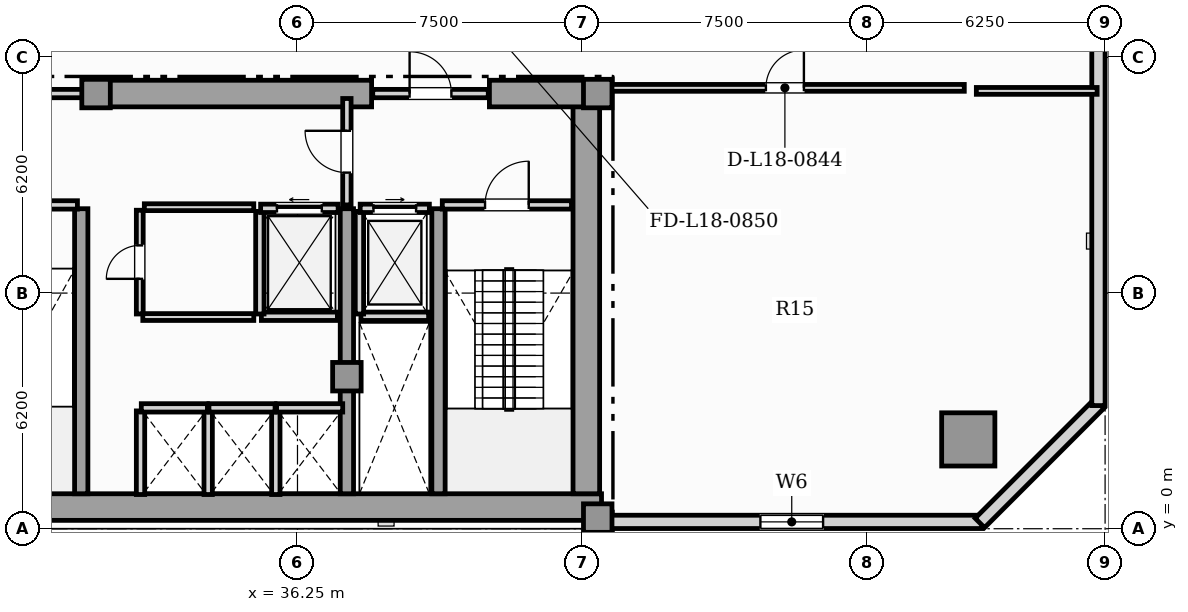
"""IFC4 building model, lengths in metres.
Left out: names, types, materials, properties, quantities, classifications, styles, units other than length and angle.
Written with IfcOpenShell. Run it as: python <this file> out.ifc"""

import sys

from ifc_helpers import new_model, si_unit, direction, frame, frame_2d, origin, origin_2d, place, context, subcontext, project, spatial, rectangle, hollow_rectangle, extrude, element, fill, save


model = new_model("IFC4")
c1 = context("Model", 3, precision=1e-05, world=origin(), true_north=direction((0.0, 1.0)))
c2 = subcontext(c1, "Body", "Model", "MODEL_VIEW")
j1 = project(units=[si_unit("LENGTHUNIT", "METRE"), si_unit("PLANEANGLEUNIT", "RADIAN")], contexts=[c1])
p1 = place(None, origin())
s1 = spatial("IfcSite", under=j1, at=p1, CompositionType="ELEMENT")
p2 = place(p1, origin())
s2 = spatial("IfcBuilding", under=s1, at=p2, CompositionType="ELEMENT")
p3 = place(p2, frame((0.0, 0.0, 76.0)))
s3 = spatial("IfcBuildingStorey", under=s2, at=p3, CompositionType="ELEMENT", Elevation=76.0)
p4 = place(p3, frame((13.25, 0.57, 0.0), z_axis=(0.0, 0.0, 1.0), x_axis=(1.0, 0.0, 0.0)))
e1 = element("IfcWall", 1, at=p4, inside=s3, PredefinedType="SHEAR", context=c2, shape_type="SweptSolid", body=[
    extrude(rectangle(XDim=31.0, YDim=0.7, at=frame_2d((15.5, 0.0))), origin(), (0.0, 0.0, 1.0), 4.8),
])
p5 = place(p3, frame((43.85, 0.92, 0.0), z_axis=(0.0, 0.0, 1.0), x_axis=(0.0, 1.0, 0.0)))
e2 = element("IfcWall", 2, at=p5, inside=s3, PredefinedType="SHEAR", context=c2, shape_type="SweptSolid", body=[
    extrude(rectangle(XDim=10.53, YDim=0.7, at=frame_2d((5.265, 0.0))), origin(), (0.0, 0.0, 1.0), 4.8),
])
p6 = place(p3, frame((30.9, 11.45, 0.0), z_axis=(0.0, 0.0, 1.0), x_axis=(1.0, 0.0, 0.0)))
e3 = element("IfcWall", 3, at=p6, inside=s3, PredefinedType="SHEAR", context=c2, shape_type="SweptSolid", body=[
    extrude(rectangle(XDim=7.3, YDim=0.7, at=frame_2d((3.65, 0.0))), origin(), (0.0, 0.0, 1.0), 4.8),
])
p7 = place(p3, frame((41.3, 11.45, 0.0), z_axis=(0.0, 0.0, 1.0), x_axis=(1.0, 0.0, 0.0)))
e4 = element("IfcWall", 4, at=p7, inside=s3, PredefinedType="SHEAR", context=c2, shape_type="SweptSolid", body=[
    extrude(rectangle(XDim=2.95, YDim=0.7, at=frame_2d((1.475, 0.0))), origin(), (0.0, 0.0, 1.0), 4.8),
])
for number, where, z_axis, x_axis in (
    (5, (30.56, 0.92, 0.0), (0.0, 0.0, 1.0), (0.0, 1.0, 0.0)),
    (6, (37.55, 0.92, 0.0), (0.0, 0.0, 1.0), (0.0, 1.0, 0.0)),
    (7, (39.96, 0.92, 0.0), (0.0, 0.0, 1.0), (0.0, 1.0, 0.0)),
):
    element("IfcWall", number, at=place(p3, frame(where, z_axis=z_axis, x_axis=x_axis)), inside=s3, PredefinedType="SHEAR", context=c2, shape_type="SweptSolid", body=[
        extrude(rectangle(XDim=7.5, YDim=0.35, at=frame_2d((3.75, 0.0))), origin(), (0.0, 0.0, 1.0), 4.8),
    ])
for number, where, z_axis, x_axis in (
    (8, (44.15, 0.28, 0.0), (0.0, 0.0, 1.0), (1.0, 0.0, 0.0)),
    (9, (44.15, 11.45, 0.0), (0.0, 0.0, 1.0), (1.0, 0.0, 0.0)),
    (10, (37.55, 4.0, 0.0), (0.0, 0.0, 1.0), (1.0, 0.0, 0.0)),
    (11, (30.95, 11.45, 0.0), (0.0, 0.0, 1.0), (1.0, 0.0, 0.0)),
):
    element("IfcColumn", number, at=place(p3, frame(where, z_axis=z_axis, x_axis=x_axis)), inside=s3, PredefinedType="COLUMN", context=c2, shape_type="SweptSolid", body=[
        extrude(rectangle(XDim=0.75, YDim=0.75, at=origin_2d()), origin(), (0.0, 0.0, 1.0), 5.05),
    ])
p8 = place(p3, frame((53.9, 2.35, 0.0), z_axis=(0.0, 0.0, 1.0), x_axis=(1.0, 0.0, 0.0)))
e12 = element("IfcColumn", 12, at=p8, inside=s3, PredefinedType="USERDEFINED", context=c2, shape_type="SweptSolid", body=[
    extrude(hollow_rectangle(XDim=1.4, YDim=1.4, WallThickness=0.08, at=origin_2d()), origin(), (0.0, 0.0, 1.0), 5.05),
])
p9 = place(p3, frame((44.25, 0.18, 0.0), z_axis=(0.0, 0.0, 1.0), x_axis=(1.0, 0.0, 0.0)))
e13 = element("IfcWall", 13, at=p9, inside=s3, PredefinedType="SOLIDWALL", context=c2, shape_type="SweptSolid", body=[
    extrude(rectangle(XDim=10.01, YDim=0.35, at=frame_2d((5.005, 0.0))), origin(), (0.0, 0.0, 1.0), 4.8),
])
p10 = place(p9, frame((4.18, 0.0, 0.88)))
e14 = element("IfcOpeningElement", 14, at=p10, cuts=e13, PredefinedType="OPENING", context=c2, shape_type="SweptSolid", body=[
    extrude(rectangle(XDim=1.65, YDim=2.0, at=frame_2d((0.825, 1.0))), frame((0.0, 0.185, 0.0), z_axis=(0.0, -1.0, 0.0), x_axis=(1.0, 0.0, 0.0)), (0.0, 0.0, 1.0), 0.37),
])
p11 = place(p3, frame((54.205, 0.152, 0.0), z_axis=(0.0, 0.0, 1.0), x_axis=(0.707106781187, 0.707106781187, 0.0)))
e15 = element("IfcWall", 15, at=p11, inside=s3, PredefinedType="SOLIDWALL", context=c2, shape_type="SweptSolid", body=[
    extrude(rectangle(XDim=4.445, YDim=0.35, at=frame_2d((2.223, 0.0))), origin(), (0.0, 0.0, 1.0), 4.8),
])
p12 = place(p3, frame((57.325, 3.24, 0.0), z_axis=(0.0, 0.0, 1.0), x_axis=(0.0, 1.0, 0.0)))
e16 = element("IfcWall", 16, at=p12, inside=s3, PredefinedType="SOLIDWALL", context=c2, shape_type="SweptSolid", body=[
    extrude(rectangle(XDim=39.92, YDim=0.35, at=frame_2d((19.96, 0.0))), origin(), (0.0, 0.0, 1.0), 4.8),
])
p13 = place(p12, frame((17.28, 0.0, 0.85)))
e17 = element("IfcOpeningElement", 17, at=p13, cuts=e16, PredefinedType="OPENING", context=c2, shape_type="SweptSolid", body=[
    extrude(rectangle(XDim=2.4, YDim=2.0, at=frame_2d((1.2, 1.0))), frame((0.0, 0.185, 0.0), z_axis=(0.0, -1.0, 0.0), x_axis=(1.0, 0.0, 0.0)), (0.0, 0.0, 1.0), 0.37),
])
p14 = place(p12, frame((31.308, 0.0, 0.85)))
e18 = element("IfcOpeningElement", 18, at=p14, cuts=e16, PredefinedType="OPENING", context=c2, shape_type="SweptSolid", body=[
    extrude(rectangle(XDim=2.4, YDim=2.0, at=frame_2d((1.2, 1.0))), frame((0.0, 0.185, 0.0), z_axis=(0.0, -1.0, 0.0), x_axis=(1.0, 0.0, 0.0)), (0.0, 0.0, 1.0), 0.37),
])
p15 = place(p3, frame((37.92, 5.59, 0.0), z_axis=(0.0, 0.0, 1.0), x_axis=(1.0, 0.0, 0.0)))
e19 = element("IfcWall", 19, at=p15, inside=s3, PredefinedType="SOLIDWALL", context=c2, shape_type="SweptSolid", body=[
    extrude(rectangle(XDim=1.78, YDim=0.22, at=frame_2d((0.89, 0.0))), origin(), (0.0, 0.0, 1.0), 4.8),
])
p16 = place(p3, frame((37.88, 5.65, 0.0), z_axis=(0.0, 0.0, 1.0), x_axis=(0.0, 1.0, 0.0)))
e20 = element("IfcWall", 20, at=p16, inside=s3, PredefinedType="SOLIDWALL", context=c2, shape_type="SweptSolid", body=[
    extrude(rectangle(XDim=2.7, YDim=0.22, at=frame_2d((1.35, 0.0))), origin(), (0.0, 0.0, 1.0), 4.8),
])
p17 = place(p3, frame((37.9, 8.43, 0.0), z_axis=(0.0, 0.0, 1.0), x_axis=(1.0, 0.0, 0.0)))
e21 = element("IfcWall", 21, at=p17, inside=s3, PredefinedType="SOLIDWALL", context=c2, shape_type="SweptSolid", body=[
    extrude(rectangle(XDim=1.82, YDim=0.22, at=frame_2d((0.91, 0.0))), origin(), (0.0, 0.0, 1.0), 4.8),
])
p18 = place(p17, frame((0.35, 0.0, 0.0)))
e22 = element("IfcOpeningElement", 22, at=p18, cuts=e21, PredefinedType="OPENING", context=c2, shape_type="SweptSolid", body=[
    extrude(rectangle(XDim=1.12, YDim=2.25, at=frame_2d((0.56, 1.125))), frame((0.0, 0.12, 0.0), z_axis=(0.0, -1.0, 0.0), x_axis=(1.0, 0.0, 0.0)), (0.0, 0.0, 1.0), 0.24),
])
p19 = place(p3, frame((35.3, 5.59, 0.0), z_axis=(0.0, 0.0, 1.0), x_axis=(1.0, 0.0, 0.0)))
e23 = element("IfcWall", 23, at=p19, inside=s3, PredefinedType="SOLIDWALL", context=c2, shape_type="SweptSolid", body=[
    extrude(rectangle(XDim=2.0, YDim=0.22, at=frame_2d((1.0, 0.0))), origin(), (0.0, 0.0, 1.0), 4.8),
])
p20 = place(p3, frame((35.26, 5.65, 0.0), z_axis=(0.0, 0.0, 1.0), x_axis=(0.0, 1.0, 0.0)))
e24 = element("IfcWall", 24, at=p20, inside=s3, PredefinedType="SOLIDWALL", context=c2, shape_type="SweptSolid", body=[
    extrude(rectangle(XDim=2.7, YDim=0.22, at=frame_2d((1.35, 0.0))), origin(), (0.0, 0.0, 1.0), 4.8),
])
p21 = place(p3, frame((35.28, 8.43, 0.0), z_axis=(0.0, 0.0, 1.0), x_axis=(1.0, 0.0, 0.0)))
e25 = element("IfcWall", 25, at=p21, inside=s3, PredefinedType="SOLIDWALL", context=c2, shape_type="SweptSolid", body=[
    extrude(rectangle(XDim=2.04, YDim=0.22, at=frame_2d((1.02, 0.0))), origin(), (0.0, 0.0, 1.0), 4.8),
])
p22 = place(p21, frame((0.43, 0.0, 0.0)))
e26 = element("IfcOpeningElement", 26, at=p22, cuts=e25, PredefinedType="OPENING", context=c2, shape_type="SweptSolid", body=[
    extrude(rectangle(XDim=1.18, YDim=2.2, at=frame_2d((0.59, 1.1))), frame((0.0, 0.12, 0.0), z_axis=(0.0, -1.0, 0.0), x_axis=(1.0, 0.0, 0.0)), (0.0, 0.0, 1.0), 0.24),
])
for number, where, z_axis, x_axis in (
    (27, (32.12, 0.9, 0.0), (0.0, 0.0, 1.0), (0.0, 1.0, 0.0)),
    (28, (33.9, 0.9, 0.0), (0.0, 0.0, 1.0), (0.0, 1.0, 0.0)),
):
    element("IfcWall", number, at=place(p3, frame(where, z_axis=z_axis, x_axis=x_axis)), inside=s3, PredefinedType="SOLIDWALL", context=c2, shape_type="SweptSolid", body=[
        extrude(rectangle(XDim=2.2, YDim=0.22, at=frame_2d((1.1, 0.0))), origin(), (0.0, 0.0, 1.0), 4.8),
    ])
p23 = place(p3, frame((32.14, 3.18, 0.0), z_axis=(0.0, 0.0, 1.0), x_axis=(1.0, 0.0, 0.0)))
e29 = element("IfcWall", 29, at=p23, inside=s3, PredefinedType="SOLIDWALL", context=c2, shape_type="SweptSolid", body=[
    extrude(rectangle(XDim=1.74, YDim=0.22, at=frame_2d((0.87, 0.0))), origin(), (0.0, 0.0, 1.0), 4.8),
])
p24 = place(p3, frame((35.68, 0.9, 0.0), z_axis=(0.0, 0.0, 1.0), x_axis=(0.0, 1.0, 0.0)))
e30 = element("IfcWall", 30, at=p24, inside=s3, PredefinedType="SOLIDWALL", context=c2, shape_type="SweptSolid", body=[
    extrude(rectangle(XDim=2.2, YDim=0.22, at=frame_2d((1.1, 0.0))), origin(), (0.0, 0.0, 1.0), 4.8),
])
for number, where, z_axis, x_axis in (
    (31, (33.92, 3.18, 0.0), (0.0, 0.0, 1.0), (1.0, 0.0, 0.0)),
    (32, (35.7, 3.18, 0.0), (0.0, 0.0, 1.0), (1.0, 0.0, 0.0)),
):
    element("IfcWall", number, at=place(p3, frame(where, z_axis=z_axis, x_axis=x_axis)), inside=s3, PredefinedType="SOLIDWALL", context=c2, shape_type="SweptSolid", body=[
        extrude(rectangle(XDim=1.74, YDim=0.22, at=frame_2d((0.87, 0.0))), origin(), (0.0, 0.0, 1.0), 4.8),
    ])
p25 = place(p3, frame((40.06, 8.52, 0.0), z_axis=(0.0, 0.0, 1.0), x_axis=(1.0, 0.0, 0.0)))
e33 = element("IfcWall", 33, at=p25, inside=s3, PredefinedType="SOLIDWALL", context=c2, shape_type="SweptSolid", body=[
    extrude(rectangle(XDim=3.4, YDim=0.22, at=frame_2d((1.7, 0.0))), origin(), (0.0, 0.0, 1.0), 4.8),
])
p26 = place(p25, frame((1.125, 0.0, 0.0)))
e34 = element("IfcOpeningElement", 34, at=p26, cuts=e33, PredefinedType="OPENING", context=c2, shape_type="SweptSolid", body=[
    extrude(rectangle(XDim=1.15, YDim=2.2, at=frame_2d((0.575, 1.1))), frame((0.0, 0.12, 0.0), z_axis=(0.0, -1.0, 0.0), x_axis=(1.0, 0.0, 0.0)), (0.0, 0.0, 1.0), 0.24),
])
p27 = place(p3, frame((27.04, 8.52, 0.0), z_axis=(0.0, 0.0, 1.0), x_axis=(1.0, 0.0, 0.0)))
e35 = element("IfcWall", 35, at=p27, inside=s3, PredefinedType="SOLIDWALL", context=c2, shape_type="SweptSolid", body=[
    extrude(rectangle(XDim=3.42, YDim=0.22, at=frame_2d((1.71, 0.0))), origin(), (0.0, 0.0, 1.0), 4.8),
])
p28 = place(p27, frame((1.135, 0.0, 0.0)))
e36 = element("IfcOpeningElement", 36, at=p28, cuts=e35, PredefinedType="OPENING", context=c2, shape_type="SweptSolid", body=[
    extrude(rectangle(XDim=1.15, YDim=2.2, at=frame_2d((0.575, 1.1))), frame((0.0, 0.12, 0.0), z_axis=(0.0, -1.0, 0.0), x_axis=(1.0, 0.0, 0.0)), (0.0, 0.0, 1.0), 0.24),
])
p29 = place(p3, frame((37.55, 8.52, 0.0), z_axis=(0.0, 0.0, 1.0), x_axis=(0.0, 1.0, 0.0)))
e37 = element("IfcWall", 37, at=p29, inside=s3, PredefinedType="SOLIDWALL", context=c2, shape_type="SweptSolid", body=[
    extrude(rectangle(XDim=2.8, YDim=0.22, at=frame_2d((1.4, 0.0))), origin(), (0.0, 0.0, 1.0), 4.256),
])
p30 = place(p29, frame((0.85, 0.0, 0.0)))
e38 = element("IfcOpeningElement", 38, at=p30, cuts=e37, PredefinedType="OPENING", context=c2, shape_type="SweptSolid", body=[
    extrude(rectangle(XDim=1.1, YDim=2.2, at=frame_2d((0.55, 1.1))), frame((0.0, 0.12, 0.0), z_axis=(0.0, -1.0, 0.0), x_axis=(1.0, 0.0, 0.0)), (0.0, 0.0, 1.0), 0.24),
])
p31 = place(p3, frame((26.63, 11.45, 0.0), z_axis=(0.0, 0.0, 1.0), x_axis=(1.0, 0.0, 0.0)))
e39 = element("IfcWall", 39, at=p31, inside=s3, PredefinedType="SOLIDWALL", context=c2, shape_type="SweptSolid", body=[
    extrude(rectangle(XDim=4.24, YDim=0.22, at=frame_2d((2.12, 0.0))), origin(), (0.0, 0.0, 1.0), 4.8),
])
p32 = place(p31, frame((1.42, 0.0, 0.0)))
e40 = element("IfcOpeningElement", 40, at=p32, cuts=e39, PredefinedType="OPENING", context=c2, shape_type="SweptSolid", body=[
    extrude(rectangle(XDim=1.4, YDim=2.2, at=frame_2d((0.7, 1.1))), frame((0.0, 0.12, 0.0), z_axis=(0.0, -1.0, 0.0), x_axis=(1.0, 0.0, 0.0)), (0.0, 0.0, 1.0), 0.24),
])
p33 = place(p3, frame((38.23, 11.45, 0.0), z_axis=(0.0, 0.0, 1.0), x_axis=(1.0, 0.0, 0.0)))
e41 = element("IfcWall", 41, at=p33, inside=s3, PredefinedType="SOLIDWALL", context=c2, shape_type="SweptSolid", body=[
    extrude(rectangle(XDim=3.04, YDim=0.22, at=frame_2d((1.52, 0.0))), origin(), (0.0, 0.0, 1.0), 4.8),
])
p34 = place(p33, frame((0.97, 0.0, 0.0)))
e42 = element("IfcOpeningElement", 42, at=p34, cuts=e41, PredefinedType="OPENING", context=c2, shape_type="SweptSolid", body=[
    extrude(rectangle(XDim=1.1, YDim=2.2, at=frame_2d((0.55, 1.1))), frame((0.0, 0.12, 0.0), z_axis=(0.0, -1.0, 0.0), x_axis=(1.0, 0.0, 0.0)), (0.0, 0.0, 1.0), 0.24),
])
p35 = place(p3, frame((32.1, 5.65, 0.0), z_axis=(0.0, 0.0, 1.0), x_axis=(0.0, 1.0, 0.0)))
e43 = element("IfcWall", 43, at=p35, inside=s3, PredefinedType="PARTITIONING", context=c2, shape_type="SweptSolid", body=[
    extrude(rectangle(XDim=2.73, YDim=0.18, at=frame_2d((1.365, 0.0))), origin(), (0.0, 0.0, 1.0), 4.8),
])
p36 = place(p35, frame((0.925, 0.0, 0.0)))
e44 = element("IfcOpeningElement", 44, at=p36, cuts=e43, PredefinedType="OPENING", context=c2, shape_type="SweptSolid", body=[
    extrude(rectangle(XDim=0.88, YDim=2.05, at=frame_2d((0.44, 1.025))), frame((0.0, 0.1, 0.0), z_axis=(0.0, -1.0, 0.0), x_axis=(1.0, 0.0, 0.0)), (0.0, 0.0, 1.0), 0.2),
])
p37 = place(p3, frame((32.22, 8.46, 0.0), z_axis=(0.0, 0.0, 1.0), x_axis=(1.0, 0.0, 0.0)))
e45 = element("IfcWall", 45, at=p37, inside=s3, PredefinedType="PARTITIONING", context=c2, shape_type="SweptSolid", body=[
    extrude(rectangle(XDim=2.88, YDim=0.18, at=frame_2d((1.44, 0.0))), origin(), (0.0, 0.0, 1.0), 4.8),
])
p38 = place(p3, frame((32.18, 5.57, 0.0), z_axis=(0.0, 0.0, 1.0), x_axis=(1.0, 0.0, 0.0)))
e46 = element("IfcWall", 46, at=p38, inside=s3, PredefinedType="PARTITIONING", context=c2, shape_type="SweptSolid", body=[
    extrude(rectangle(XDim=2.92, YDim=0.18, at=frame_2d((1.46, 0.0))), origin(), (0.0, 0.0, 1.0), 4.8),
])
p39 = place(p3, frame((44.355, 11.6, 0.0), z_axis=(0.0, 0.0, 1.0), x_axis=(1.0, 0.0, 0.0)))
e47 = element("IfcWall", 47, at=p39, inside=s3, PredefinedType="PARTITIONING", context=c2, shape_type="SweptSolid", body=[
    extrude(rectangle(XDim=9.44, YDim=0.18, at=frame_2d((4.72, 0.0))), origin(), (0.0, 0.0, 1.0), 4.8),
])
p40 = place(p39, frame((4.22, 0.0, 0.0)))
e48 = element("IfcOpeningElement", 48, at=p40, cuts=e47, PredefinedType="OPENING", context=c2, shape_type="SweptSolid", body=[
    extrude(rectangle(XDim=1.0, YDim=2.15, at=frame_2d((0.5, 1.075))), frame((0.0, 0.1, 0.0), z_axis=(0.0, -1.0, 0.0), x_axis=(1.0, 0.0, 0.0)), (0.0, 0.0, 1.0), 0.2),
])
p41 = place(p3, frame((54.112, 11.52, 0.0), z_axis=(0.0, 0.0, 1.0), x_axis=(1.0, 0.0, 0.0)))
e49 = element("IfcWall", 49, at=p41, inside=s3, PredefinedType="PARTITIONING", context=c2, shape_type="SweptSolid", body=[
    extrude(rectangle(XDim=3.178, YDim=0.18, at=frame_2d((1.589, 0.0))), origin(), (0.0, 0.0, 1.0), 4.8),
])
p42 = place(p10, origin())
e50 = element("IfcWindow", 50, at=p42, inside=s3, PartitioningType="SINGLE_PANEL", PredefinedType="WINDOW", context=c2, shape_type="SweptSolid", body=[
    extrude(rectangle(XDim=1.65, YDim=2.0, at=frame_2d((0.825, 1.0))), frame((0.0, 0.03, 0.0), z_axis=(0.0, -1.0, 0.0), x_axis=(1.0, 0.0, 0.0)), (0.0, 0.0, 1.0), 0.06),
])
fill(e14, e50)
p43 = place(p18, origin())
e51 = element("IfcDoor", 51, at=p43, inside=s3, OperationType="SLIDING_TO_RIGHT", PredefinedType="DOOR", context=c2, shape_type="SweptSolid", body=[
    extrude(rectangle(XDim=1.12, YDim=2.25, at=frame_2d((0.56, 1.125))), frame((0.0, 0.025, 0.0), z_axis=(0.0, -1.0, 0.0), x_axis=(1.0, 0.0, 0.0)), (0.0, 0.0, 1.0), 0.05),
])
fill(e22, e51)
p44 = place(p22, origin())
e52 = element("IfcDoor", 52, at=p44, inside=s3, OperationType="SLIDING_TO_LEFT", PredefinedType="DOOR", context=c2, shape_type="SweptSolid", body=[
    extrude(rectangle(XDim=1.18, YDim=2.2, at=frame_2d((0.59, 1.1))), frame((0.0, 0.025, 0.0), z_axis=(0.0, -1.0, 0.0), x_axis=(1.0, 0.0, 0.0)), (0.0, 0.0, 1.0), 0.05),
])
fill(e26, e52)
p45 = place(p26, origin())
e53 = element("IfcDoor", 53, at=p45, inside=s3, OperationType="SINGLE_SWING_RIGHT", PredefinedType="DOOR", context=c2, shape_type="SweptSolid", body=[
    extrude(rectangle(XDim=1.15, YDim=2.2, at=frame_2d((0.575, 1.1))), frame((0.0, 0.025, 0.0), z_axis=(0.0, -1.0, 0.0), x_axis=(1.0, 0.0, 0.0)), (0.0, 0.0, 1.0), 0.05),
])
fill(e34, e53)
p46 = place(p30, origin())
e54 = element("IfcDoor", 54, at=p46, inside=s3, OperationType="SINGLE_SWING_RIGHT", PredefinedType="DOOR", context=c2, shape_type="SweptSolid", body=[
    extrude(rectangle(XDim=1.1, YDim=2.2, at=frame_2d((0.55, 1.1))), frame((0.0, 0.025, 0.0), z_axis=(0.0, -1.0, 0.0), x_axis=(1.0, 0.0, 0.0)), (0.0, 0.0, 1.0), 0.05),
])
fill(e38, e54)
p47 = place(p34, origin())
e55 = element("IfcDoor", 55, at=p47, inside=s3, OperationType="SINGLE_SWING_LEFT", PredefinedType="DOOR", context=c2, shape_type="SweptSolid", body=[
    extrude(rectangle(XDim=1.1, YDim=2.2, at=frame_2d((0.55, 1.1))), frame((0.0, 0.025, 0.0), z_axis=(0.0, -1.0, 0.0), x_axis=(1.0, 0.0, 0.0)), (0.0, 0.0, 1.0), 0.05),
])
fill(e42, e55)
p48 = place(p36, origin())
e56 = element("IfcDoor", 56, at=p48, inside=s3, OperationType="SINGLE_SWING_LEFT", PredefinedType="DOOR", context=c2, shape_type="SweptSolid", body=[
    extrude(rectangle(XDim=0.88, YDim=2.05, at=frame_2d((0.44, 1.025))), frame((0.0, 0.025, 0.0), z_axis=(0.0, -1.0, 0.0), x_axis=(1.0, 0.0, 0.0)), (0.0, 0.0, 1.0), 0.05),
])
fill(e44, e56)
p49 = place(p40, origin())
e57 = element("IfcDoor", 57, at=p49, inside=s3, OperationType="SINGLE_SWING_RIGHT", PredefinedType="DOOR", context=c2, shape_type="SweptSolid", body=[
    extrude(rectangle(XDim=1.0, YDim=2.15, at=frame_2d((0.5, 1.075))), frame((0.0, 0.025, 0.0), z_axis=(0.0, -1.0, 0.0), x_axis=(1.0, 0.0, 0.0)), (0.0, 0.0, 1.0), 0.05),
])
fill(e48, e57)
save(model, sys.argv[1])
